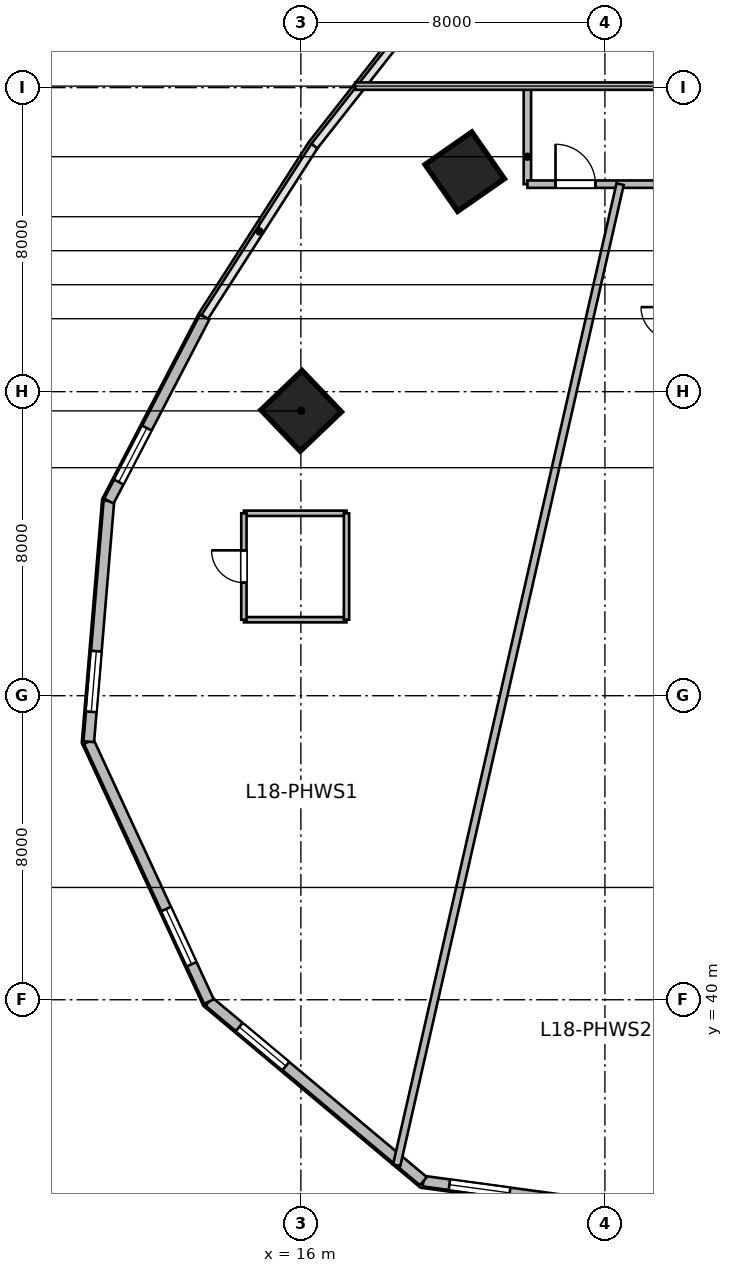
"""IFC4 building model, lengths in metres.
Left out: names, types, materials, properties, quantities, classifications, styles, units other than length and angle.
Written with IfcOpenShell. Run it as: python <this file> out.ifc"""

import sys

from ifc_helpers import new_model, si_unit, direction, frame, frame_2d, origin, origin_2d, place, context, subcontext, project, spatial, rectangle, extrude, source, transform, mapped, element, fill, save


model = new_model("IFC4")
c1 = context("Model", 3, precision=1e-05, world=origin(), true_north=direction((0.0, 1.0)))
c2 = subcontext(c1, "Body", "Model", "MODEL_VIEW")
j1 = project(units=[si_unit("LENGTHUNIT", "METRE"), si_unit("PLANEANGLEUNIT", "RADIAN")], contexts=[c1])
p1 = place(None, origin())
s1 = spatial("IfcSite", under=j1, at=p1, CompositionType="ELEMENT")
p2 = place(p1, origin())
s2 = spatial("IfcBuilding", under=s1, at=p2, CompositionType="ELEMENT")
p3 = place(p2, frame((0.0, 0.0, 78.6)))
s3 = spatial("IfcBuildingStorey", under=s2, at=p3, CompositionType="ELEMENT", Elevation=78.6)
m1 = source(origin(), c2, "Body", "SweptSolid", [
    extrude(rectangle(XDim=1.5, YDim=1.5, at=origin_2d()), origin(), (0.0, 0.0, 1.0), 3.6),
])
for number, where, z_axis, x_axis in (
    (1, (16.007, 55.494, 0.0), (0.0, 0.0, 1.0), (-0.691, 0.723, 0.0)),
    (2, (20.311, 61.789, 0.0), (0.0, 0.0, 1.0), (-0.571, 0.821, 0.0)),
):
    element("IfcColumn", number, at=place(p3, frame(where, z_axis=z_axis, x_axis=x_axis)), inside=s3, PredefinedType="COLUMN", context=c2, shape_type="MappedRepresentation", body=[
        mapped(m1, transform((0.0, 0.0, 0.0), scale=1.0)),
    ])
m2 = source(origin(), c2, "Body", "SweptSolid", [
    extrude(rectangle(XDim=5.222, YDim=0.28, at=frame_2d((2.611, 0.0))), origin(), (0.0, 0.0, 1.0), 3.36),
])
p4 = place(p3, frame((29.115, 37.807, 0.0), z_axis=(0.0, 0.0, 1.0), x_axis=(-0.761900099546, -0.647694556339, 0.0)))
e3 = element("IfcWall", 3, at=p4, inside=s3, PredefinedType="SOLIDWALL", context=c2, shape_type="MappedRepresentation", body=[
    mapped(m2, transform((0.0, 0.0, 0.0), scale=1.0)),
])
p5 = place(p4, frame((3.117, 0.0, 0.95)))
e4 = element("IfcOpeningElement", 4, at=p5, cuts=e3, PredefinedType="OPENING", context=c2, shape_type="SweptSolid", body=[
    extrude(rectangle(XDim=1.6, YDim=1.9, at=frame_2d((0.8, 0.95))), frame((0.0, 0.15, 0.0), z_axis=(0.0, -1.0, 0.0), x_axis=(1.0, 0.0, 0.0)), (0.0, 0.0, 1.0), 0.3),
])
m3 = source(origin(), c2, "Body", "SweptSolid", [
    extrude(rectangle(XDim=5.967, YDim=0.28, at=frame_2d((2.984, 0.0))), origin(), (0.0, 0.0, 1.0), 3.36),
])
p6 = place(p3, frame((25.136, 34.425, 0.0), z_axis=(0.0, 0.0, 1.0), x_axis=(-0.990927009341, 0.134401124099, 0.0)))
e5 = element("IfcWall", 5, at=p6, inside=s3, PredefinedType="SOLIDWALL", context=c2, shape_type="MappedRepresentation", body=[
    mapped(m3, transform((0.0, 0.0, 0.0), scale=1.0)),
])
p7 = place(p6, frame((3.676, 0.0, 0.95)))
e6 = element("IfcOpeningElement", 6, at=p7, cuts=e5, PredefinedType="OPENING", context=c2, shape_type="SweptSolid", body=[
    extrude(rectangle(XDim=1.6, YDim=1.9, at=frame_2d((0.8, 0.95))), frame((0.0, 0.15, 0.0), z_axis=(0.0, -1.0, 0.0), x_axis=(1.0, 0.0, 0.0)), (0.0, 0.0, 1.0), 0.3),
])
m4 = source(origin(), c2, "Body", "SweptSolid", [
    extrude(rectangle(XDim=7.359, YDim=0.28, at=frame_2d((3.679, 0.0))), origin(), (0.0, 0.0, 1.0), 3.36),
])
p8 = place(p3, frame((19.223, 35.227, 0.0), z_axis=(0.0, 0.0, 1.0), x_axis=(-0.766737165543, 0.641961150675, 0.0)))
e7 = element("IfcWall", 7, at=p8, inside=s3, PredefinedType="SOLIDWALL", context=c2, shape_type="MappedRepresentation", body=[
    mapped(m4, transform((0.0, 0.0, 0.0), scale=1.0)),
])
p9 = place(p8, frame((4.719, 0.0, 0.95)))
e8 = element("IfcOpeningElement", 8, at=p9, cuts=e7, PredefinedType="OPENING", context=c2, shape_type="SweptSolid", body=[
    extrude(rectangle(XDim=1.6, YDim=1.9, at=frame_2d((0.8, 0.95))), frame((0.0, 0.15, 0.0), z_axis=(0.0, -1.0, 0.0), x_axis=(1.0, 0.0, 0.0)), (0.0, 0.0, 1.0), 0.3),
])
m5 = source(origin(), c2, "Body", "SweptSolid", [
    extrude(rectangle(XDim=7.536, YDim=0.28, at=frame_2d((3.768, 0.0))), origin(), (0.0, 0.0, 1.0), 3.36),
])
p10 = place(p3, frame((13.58, 39.951, 0.0), z_axis=(0.0, 0.0, 1.0), x_axis=(-0.41964973873, 0.907686122393, 0.0)))
e9 = element("IfcWall", 9, at=p10, inside=s3, PredefinedType="SOLIDWALL", context=c2, shape_type="MappedRepresentation", body=[
    mapped(m5, transform((0.0, 0.0, 0.0), scale=1.0)),
])
p11 = place(p10, frame((1.084, 0.0, 0.95)))
e10 = element("IfcOpeningElement", 10, at=p11, cuts=e9, PredefinedType="OPENING", context=c2, shape_type="SweptSolid", body=[
    extrude(rectangle(XDim=1.6, YDim=1.9, at=frame_2d((0.8, 0.95))), frame((0.0, 0.15, 0.0), z_axis=(0.0, -1.0, 0.0), x_axis=(1.0, 0.0, 0.0)), (0.0, 0.0, 1.0), 0.3),
])
m6 = source(origin(), c2, "Body", "SweptSolid", [
    extrude(rectangle(XDim=6.353, YDim=0.28, at=frame_2d((3.176, 0.0))), origin(), (0.0, 0.0, 1.0), 3.36),
])
p12 = place(p3, frame((10.418, 46.792, 0.0), z_axis=(0.0, 0.0, 1.0), x_axis=(0.083319001377, 0.996522926986, 0.0)))
e11 = element("IfcWall", 11, at=p12, inside=s3, PredefinedType="SOLIDWALL", context=c2, shape_type="MappedRepresentation", body=[
    mapped(m6, transform((0.0, 0.0, 0.0), scale=1.0)),
])
p13 = place(p12, frame((0.788, 0.0, 0.95)))
e12 = element("IfcOpeningElement", 12, at=p13, cuts=e11, PredefinedType="OPENING", context=c2, shape_type="SweptSolid", body=[
    extrude(rectangle(XDim=1.6, YDim=1.9, at=frame_2d((0.8, 0.95))), frame((0.0, 0.15, 0.0), z_axis=(0.0, -1.0, 0.0), x_axis=(1.0, 0.0, 0.0)), (0.0, 0.0, 1.0), 0.3),
])
m7 = source(origin(), c2, "Body", "SweptSolid", [
    extrude(rectangle(XDim=5.459, YDim=0.28, at=frame_2d((2.73, 0.0))), origin(), (0.0, 0.0, 1.0), 3.36),
])
p14 = place(p3, frame((10.947, 53.122, 0.0), z_axis=(0.0, 0.0, 1.0), x_axis=(0.461768054321, 0.887000712518, 0.0)))
e13 = element("IfcWall", 13, at=p14, inside=s3, PredefinedType="SOLIDWALL", context=c2, shape_type="MappedRepresentation", body=[
    mapped(m7, transform((0.0, 0.0, 0.0), scale=1.0)),
])
p15 = place(p14, frame((0.565, 0.0, 0.95)))
e14 = element("IfcOpeningElement", 14, at=p15, cuts=e13, PredefinedType="OPENING", context=c2, shape_type="SweptSolid", body=[
    extrude(rectangle(XDim=1.6, YDim=1.9, at=frame_2d((0.8, 0.95))), frame((0.0, 0.15, 0.0), z_axis=(0.0, -1.0, 0.0), x_axis=(1.0, 0.0, 0.0)), (0.0, 0.0, 1.0), 0.3),
])
m8 = source(origin(), c2, "Body", "SweptSolid", [
    extrude(rectangle(XDim=2.58, YDim=0.195, at=frame_2d((1.29, 0.0))), origin(), (0.0, 0.0, 1.0), 3.36),
])
p16 = place(p3, frame((21.96, 61.46, 0.0), z_axis=(0.0, 0.0, 1.0), x_axis=(0.0, 1.0, 0.0)))
e15 = element("IfcWall", 15, at=p16, inside=s3, PredefinedType="PARTITIONING", context=c2, shape_type="MappedRepresentation", body=[
    mapped(m8, transform((0.0, 0.0, 0.0), scale=1.0)),
])
m9 = source(origin(), c2, "Body", "SweptSolid", [
    extrude(rectangle(XDim=16.93, YDim=0.195, at=frame_2d((8.465, 0.0))), origin(), (0.0, 0.0, 1.0), 3.36),
])
p17 = place(p3, frame((17.43, 64.04, 0.0), z_axis=(0.0, 0.0, 1.0), x_axis=(1.0, 0.0, 0.0)))
e16 = element("IfcWall", 16, at=p17, inside=s3, PredefinedType="PARTITIONING", context=c2, shape_type="MappedRepresentation", body=[
    mapped(m9, transform((0.0, 0.0, 0.0), scale=1.0)),
])
p18 = place(p17, frame((7.94, 0.0, 0.0)))
e17 = element("IfcOpeningElement", 17, at=p18, cuts=e16, PredefinedType="OPENING", context=c2, shape_type="SweptSolid", body=[
    extrude(rectangle(XDim=1.05, YDim=2.15, at=frame_2d((0.525, 1.075))), frame((0.0, 0.107, 0.0), z_axis=(0.0, -1.0, 0.0), x_axis=(1.0, 0.0, 0.0)), (0.0, 0.0, 1.0), 0.215),
])
m10 = source(origin(), c2, "Body", "SweptSolid", [
    extrude(rectangle(XDim=12.4, YDim=0.195, at=frame_2d((6.2, 0.0))), origin(), (0.0, 0.0, 1.0), 3.36),
])
p19 = place(p3, frame((21.96, 61.46, 0.0), z_axis=(0.0, 0.0, 1.0), x_axis=(1.0, 0.0, 0.0)))
e18 = element("IfcWall", 18, at=p19, inside=s3, PredefinedType="PARTITIONING", context=c2, shape_type="MappedRepresentation", body=[
    mapped(m10, transform((0.0, 0.0, 0.0), scale=1.0)),
])
p20 = place(p19, frame((0.74, 0.0, 0.0)))
e19 = element("IfcOpeningElement", 19, at=p20, cuts=e18, PredefinedType="OPENING", context=c2, shape_type="SweptSolid", body=[
    extrude(rectangle(XDim=1.05, YDim=2.15, at=frame_2d((0.525, 1.075))), frame((0.0, 0.107, 0.0), z_axis=(0.0, -1.0, 0.0), x_axis=(1.0, 0.0, 0.0)), (0.0, 0.0, 1.0), 0.215),
])
p21 = place(p19, frame((5.675, 0.0, 0.0)))
e20 = element("IfcOpeningElement", 20, at=p21, cuts=e18, PredefinedType="OPENING", context=c2, shape_type="SweptSolid", body=[
    extrude(rectangle(XDim=1.05, YDim=2.15, at=frame_2d((0.525, 1.075))), frame((0.0, 0.107, 0.0), z_axis=(0.0, -1.0, 0.0), x_axis=(1.0, 0.0, 0.0)), (0.0, 0.0, 1.0), 0.215),
])
p22 = place(p19, frame((7.74, 0.0, 0.0)))
e21 = element("IfcOpeningElement", 21, at=p22, cuts=e18, PredefinedType="OPENING", context=c2, shape_type="SweptSolid", body=[
    extrude(rectangle(XDim=1.05, YDim=2.15, at=frame_2d((0.525, 1.075))), frame((0.0, 0.107, 0.0), z_axis=(0.0, -1.0, 0.0), x_axis=(1.0, 0.0, 0.0)), (0.0, 0.0, 1.0), 0.215),
])
m11 = source(origin(), c2, "Body", "SweptSolid", [
    extrude(rectangle(XDim=26.476, YDim=0.195, at=frame_2d((13.238, 0.0))), origin(), (0.0, 0.0, 1.0), 2.88),
])
p23 = place(p3, frame((18.52, 35.646, 0.0), z_axis=(0.0, 0.0, 1.0), x_axis=(0.22210613157, 0.975022495289, 0.0)))
e22 = element("IfcWall", 22, at=p23, inside=s3, PredefinedType="PARTITIONING", context=c2, shape_type="MappedRepresentation", body=[
    mapped(m11, transform((0.0, 0.0, 0.0), scale=1.0)),
])
m12 = source(origin(), c2, "Body", "SweptSolid", [
    extrude(rectangle(XDim=2.7, YDim=0.14, at=frame_2d((1.35, 0.0))), origin(), (0.0, 0.0, 1.0), 3.36),
])
for number, where, z_axis, x_axis in (
    (23, (14.5, 52.8, 0.0), (0.0, 0.0, 1.0), (1.0, 0.0, 0.0)),
    (24, (14.5, 50.0, 0.0), (0.0, 0.0, 1.0), (1.0, 0.0, 0.0)),
):
    element("IfcWall", number, at=place(p3, frame(where, z_axis=z_axis, x_axis=x_axis)), inside=s3, PredefinedType="PARTITIONING", context=c2, shape_type="MappedRepresentation", body=[
        mapped(m12, transform((0.0, 0.0, 0.0), scale=1.0)),
    ])
m13 = source(origin(), c2, "Body", "SweptSolid", [
    extrude(rectangle(XDim=2.8, YDim=0.14, at=frame_2d((1.4, 0.0))), origin(), (0.0, 0.0, 1.0), 3.36),
])
p24 = place(p3, frame((14.5, 50.0, 0.0), z_axis=(0.0, 0.0, 1.0), x_axis=(0.0, 1.0, 0.0)))
e25 = element("IfcWall", 25, at=p24, inside=s3, PredefinedType="PARTITIONING", context=c2, shape_type="MappedRepresentation", body=[
    mapped(m13, transform((0.0, 0.0, 0.0), scale=1.0)),
])
p25 = place(p24, frame((0.975, 0.0, 0.0)))
e26 = element("IfcOpeningElement", 26, at=p25, cuts=e25, PredefinedType="OPENING", context=c2, shape_type="SweptSolid", body=[
    extrude(rectangle(XDim=0.85, YDim=2.05, at=frame_2d((0.425, 1.025))), frame((0.0, 0.08, 0.0), z_axis=(0.0, -1.0, 0.0), x_axis=(1.0, 0.0, 0.0)), (0.0, 0.0, 1.0), 0.16),
])
p26 = place(p3, frame((17.2, 50.0, 0.0), z_axis=(0.0, 0.0, 1.0), x_axis=(0.0, 1.0, 0.0)))
e27 = element("IfcWall", 27, at=p26, inside=s3, PredefinedType="PARTITIONING", context=c2, shape_type="MappedRepresentation", body=[
    mapped(m13, transform((0.0, 0.0, 0.0), scale=1.0)),
])
m14 = source(origin(), c2, "Body", "SweptSolid", [
    extrude(rectangle(XDim=1.6, YDim=1.9, at=frame_2d((0.8, 0.95))), frame((0.0, 0.03, 0.0), z_axis=(0.0, -1.0, 0.0), x_axis=(1.0, 0.0, 0.0)), (0.0, 0.0, 1.0), 0.06),
])
p27 = place(p7, origin())
e28 = element("IfcWindow", 28, at=p27, inside=s3, PartitioningType="SINGLE_PANEL", PredefinedType="WINDOW", context=c2, shape_type="MappedRepresentation", body=[
    mapped(m14, transform((0.0, 0.0, 0.0), scale=1.0)),
])
fill(e6, e28)
p28 = place(p9, origin())
e29 = element("IfcWindow", 29, at=p28, inside=s3, PartitioningType="SINGLE_PANEL", PredefinedType="WINDOW", context=c2, shape_type="MappedRepresentation", body=[
    mapped(m14, transform((0.0, 0.0, 0.0), scale=1.0)),
])
fill(e8, e29)
p29 = place(p11, origin())
e30 = element("IfcWindow", 30, at=p29, inside=s3, PartitioningType="SINGLE_PANEL", PredefinedType="WINDOW", context=c2, shape_type="MappedRepresentation", body=[
    mapped(m14, transform((0.0, 0.0, 0.0), scale=1.0)),
])
fill(e10, e30)
p30 = place(p13, origin())
e31 = element("IfcWindow", 31, at=p30, inside=s3, PartitioningType="SINGLE_PANEL", PredefinedType="WINDOW", context=c2, shape_type="MappedRepresentation", body=[
    mapped(m14, transform((0.0, 0.0, 0.0), scale=1.0)),
])
fill(e12, e31)
p31 = place(p15, origin())
e32 = element("IfcWindow", 32, at=p31, inside=s3, PartitioningType="SINGLE_PANEL", PredefinedType="WINDOW", context=c2, shape_type="MappedRepresentation", body=[
    mapped(m14, transform((0.0, 0.0, 0.0), scale=1.0)),
])
fill(e14, e32)
m15 = source(origin(), c2, "Body", "SweptSolid", [
    extrude(rectangle(XDim=1.05, YDim=2.15, at=frame_2d((0.525, 1.075))), frame((0.0, 0.025, 0.0), z_axis=(0.0, -1.0, 0.0), x_axis=(1.0, 0.0, 0.0)), (0.0, 0.0, 1.0), 0.05),
])
p32 = place(p20, origin())
e33 = element("IfcDoor", 33, at=p32, inside=s3, OperationType="SINGLE_SWING_LEFT", PredefinedType="DOOR", context=c2, shape_type="MappedRepresentation", body=[
    mapped(m15, transform((0.0, 0.0, 0.0), scale=1.0)),
])
fill(e19, e33)
m16 = source(origin(), c2, "Body", "SweptSolid", [
    extrude(rectangle(XDim=0.85, YDim=2.05, at=frame_2d((0.425, 1.025))), frame((0.0, 0.025, 0.0), z_axis=(0.0, -1.0, 0.0), x_axis=(1.0, 0.0, 0.0)), (0.0, 0.0, 1.0), 0.05),
])
p33 = place(p25, origin())
e34 = element("IfcDoor", 34, at=p33, inside=s3, OperationType="SINGLE_SWING_RIGHT", PredefinedType="DOOR", context=c2, shape_type="MappedRepresentation", body=[
    mapped(m16, transform((0.0, 0.0, 0.0), scale=1.0)),
])
fill(e26, e34)
save(model, sys.argv[1])
